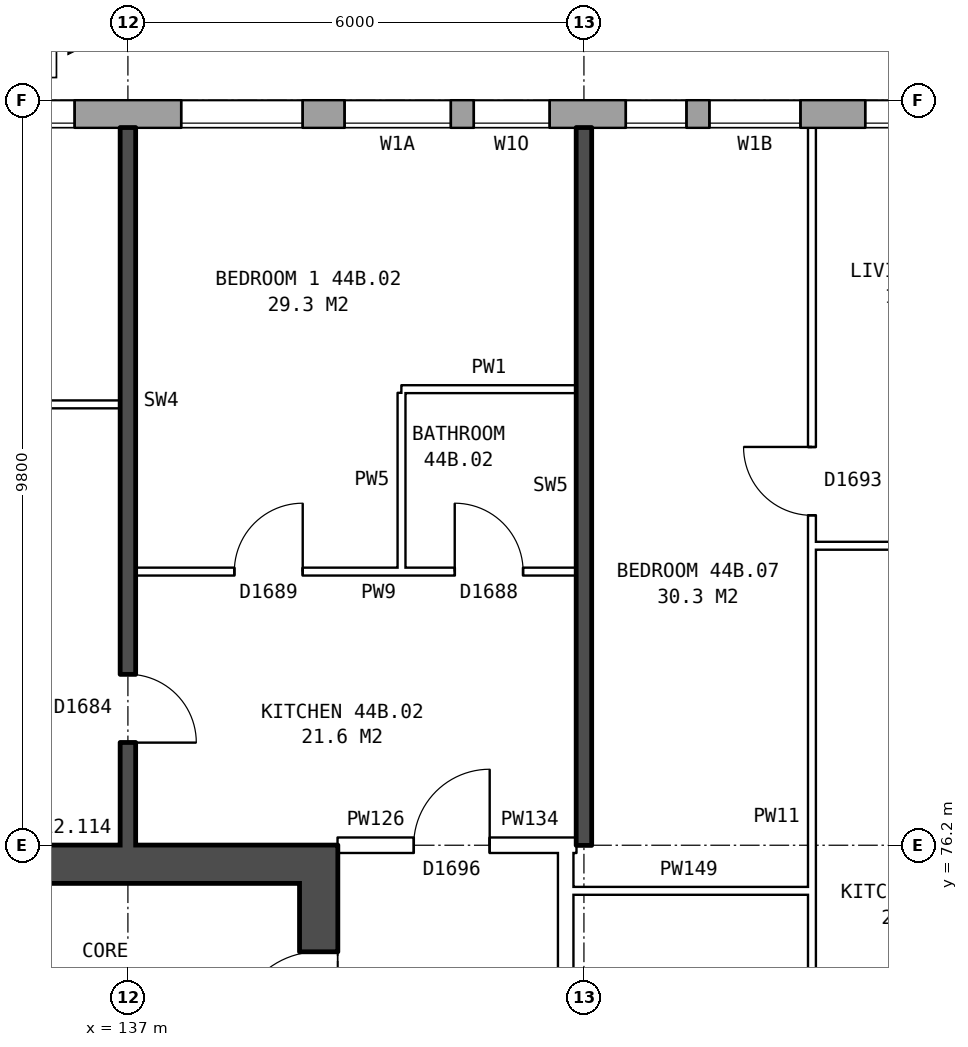
"""IFC4 building model, lengths in metres.
Left out: names, types, materials, properties, quantities, classifications, styles, units other than length and angle.
Written with IfcOpenShell. Run it as: python <this file> out.ifc"""

import sys

from ifc_helpers import new_model, si_unit, direction, frame, frame_2d, origin, place, context, subcontext, project, spatial, rectangle, extrude, element, fill, save


model = new_model("IFC4")
c1 = context("Model", 3, precision=1e-05, world=origin(), true_north=direction((0.0, 1.0)))
c2 = subcontext(c1, "Body", "Model", "MODEL_VIEW")
j1 = project(units=[si_unit("LENGTHUNIT", "METRE"), si_unit("PLANEANGLEUNIT", "RADIAN")], contexts=[c1])
p1 = place(None, origin())
s1 = spatial("IfcSite", under=j1, at=p1, CompositionType="ELEMENT")
p2 = place(p1, origin())
s2 = spatial("IfcBuilding", under=s1, at=p2, CompositionType="ELEMENT")
p3 = place(p2, frame((0.0, 0.0, 157.8)))
s3 = spatial("IfcBuildingStorey", under=s2, at=p3, CompositionType="ELEMENT", Elevation=157.8)
p4 = place(p3, frame((168.425, 85.82, 0.0), z_axis=(0.0, 0.0, 1.0), x_axis=(-1.0, 0.0, 0.0)))
e1 = element("IfcWall", 1, at=p4, inside=s3, PredefinedType="STANDARD", context=c2, shape_type="SweptSolid", body=[
    extrude(rectangle(XDim=34.351, YDim=0.36, at=frame_2d((17.175, 0.0))), origin(), (0.0, 0.0, 1.0), 2.85),
])
p5 = place(p4, frame((2.125, 0.0, 0.8)))
e2 = element("IfcOpeningElement", 2, at=p5, cuts=e1, PredefinedType="OPENING", context=c2, shape_type="SweptSolid", body=[
    extrude(rectangle(XDim=1.6, YDim=1.8, at=frame_2d((0.8, 0.9))), frame((0.0, 0.19, 0.0), z_axis=(0.0, -1.0, 0.0), x_axis=(1.0, 0.0, 0.0)), (0.0, 0.0, 1.0), 0.38),
])
p6 = place(p4, frame((5.125, 0.0, 0.8)))
e3 = element("IfcOpeningElement", 3, at=p6, cuts=e1, PredefinedType="OPENING", context=c2, shape_type="SweptSolid", body=[
    extrude(rectangle(XDim=1.6, YDim=1.8, at=frame_2d((0.8, 0.9))), frame((0.0, 0.19, 0.0), z_axis=(0.0, -1.0, 0.0), x_axis=(1.0, 0.0, 0.0)), (0.0, 0.0, 1.0), 0.38),
])
p7 = place(p4, frame((7.625, 0.0, 1.7)))
e4 = element("IfcOpeningElement", 4, at=p7, cuts=e1, PredefinedType="OPENING", context=c2, shape_type="SweptSolid", body=[
    extrude(rectangle(XDim=1.2, YDim=0.9, at=frame_2d((0.6, 0.45))), frame((0.0, 0.19, 0.0), z_axis=(0.0, -1.0, 0.0), x_axis=(1.0, 0.0, 0.0)), (0.0, 0.0, 1.0), 0.38),
])
p8 = place(p4, frame((11.125, 0.0, 0.8)))
e5 = element("IfcOpeningElement", 5, at=p8, cuts=e1, PredefinedType="OPENING", context=c2, shape_type="SweptSolid", body=[
    extrude(rectangle(XDim=1.6, YDim=1.8, at=frame_2d((0.8, 0.9))), frame((0.0, 0.19, 0.0), z_axis=(0.0, -1.0, 0.0), x_axis=(1.0, 0.0, 0.0)), (0.0, 0.0, 1.0), 0.38),
])
p9 = place(p4, frame((14.125, 0.0, 0.8)))
e6 = element("IfcOpeningElement", 6, at=p9, cuts=e1, PredefinedType="OPENING", context=c2, shape_type="SweptSolid", body=[
    extrude(rectangle(XDim=1.6, YDim=1.8, at=frame_2d((0.8, 0.9))), frame((0.0, 0.19, 0.0), z_axis=(0.0, -1.0, 0.0), x_axis=(1.0, 0.0, 0.0)), (0.0, 0.0, 1.0), 0.38),
])
p10 = place(p4, frame((17.125, 0.0, 0.8)))
e7 = element("IfcOpeningElement", 7, at=p10, cuts=e1, PredefinedType="OPENING", context=c2, shape_type="SweptSolid", body=[
    extrude(rectangle(XDim=1.6, YDim=1.8, at=frame_2d((0.8, 0.9))), frame((0.0, 0.19, 0.0), z_axis=(0.0, -1.0, 0.0), x_axis=(1.0, 0.0, 0.0)), (0.0, 0.0, 1.0), 0.38),
])
p11 = place(p4, frame((20.125, 0.0, 0.8)))
e8 = element("IfcOpeningElement", 8, at=p11, cuts=e1, PredefinedType="OPENING", context=c2, shape_type="SweptSolid", body=[
    extrude(rectangle(XDim=1.6, YDim=1.8, at=frame_2d((0.8, 0.9))), frame((0.0, 0.19, 0.0), z_axis=(0.0, -1.0, 0.0), x_axis=(1.0, 0.0, 0.0)), (0.0, 0.0, 1.0), 0.38),
])
p12 = place(p4, frame((22.575, 0.0, 0.45)))
e9 = element("IfcOpeningElement", 9, at=p12, cuts=e1, PredefinedType="OPENING", context=c2, shape_type="SweptSolid", body=[
    extrude(rectangle(XDim=1.2, YDim=1.8, at=frame_2d((0.6, 0.9))), frame((0.0, 0.19, 0.0), z_axis=(0.0, -1.0, 0.0), x_axis=(1.0, 0.0, 0.0)), (0.0, 0.0, 1.0), 0.38),
])
p13 = place(p4, frame((25.875, 0.0, 1.4)))
e10 = element("IfcOpeningElement", 10, at=p13, cuts=e1, PredefinedType="OPENING", context=c2, shape_type="SweptSolid", body=[
    extrude(rectangle(XDim=1.0, YDim=1.2, at=frame_2d((0.5, 0.6))), frame((0.0, 0.19, 0.0), z_axis=(0.0, -1.0, 0.0), x_axis=(1.0, 0.0, 0.0)), (0.0, 0.0, 1.0), 0.38),
])
p14 = place(p4, frame((29.125, 0.0, 0.8)))
e11 = element("IfcOpeningElement", 11, at=p14, cuts=e1, PredefinedType="OPENING", context=c2, shape_type="SweptSolid", body=[
    extrude(rectangle(XDim=1.6, YDim=1.8, at=frame_2d((0.8, 0.9))), frame((0.0, 0.19, 0.0), z_axis=(0.0, -1.0, 0.0), x_axis=(1.0, 0.0, 0.0)), (0.0, 0.0, 1.0), 0.38),
])
p15 = place(p4, frame((32.125, 0.0, 0.8)))
e12 = element("IfcOpeningElement", 12, at=p15, cuts=e1, PredefinedType="OPENING", context=c2, shape_type="SweptSolid", body=[
    extrude(rectangle(XDim=1.6, YDim=1.8, at=frame_2d((0.8, 0.9))), frame((0.0, 0.19, 0.0), z_axis=(0.0, -1.0, 0.0), x_axis=(1.0, 0.0, 0.0)), (0.0, 0.0, 1.0), 0.38),
])
p16 = place(p4, frame((9.975, 0.0, 0.8)))
e13 = element("IfcOpeningElement", 13, at=p16, cuts=e1, PredefinedType="OPENING", context=c2, shape_type="SweptSolid", body=[
    extrude(rectangle(XDim=0.8, YDim=0.9, at=frame_2d((0.4, 0.45))), frame((0.0, 0.19, 0.0), z_axis=(0.0, -1.0, 0.0), x_axis=(1.0, 0.0, 0.0)), (0.0, 0.0, 1.0), 0.38),
])
p17 = place(p4, frame((24.075, 0.0, 0.35)))
e14 = element("IfcOpeningElement", 14, at=p17, cuts=e1, PredefinedType="OPENING", context=c2, shape_type="SweptSolid", body=[
    extrude(rectangle(XDim=0.8, YDim=0.9, at=frame_2d((0.4, 0.45))), frame((0.0, 0.19, 0.0), z_axis=(0.0, -1.0, 0.0), x_axis=(1.0, 0.0, 0.0)), (0.0, 0.0, 1.0), 0.38),
])
p18 = place(p4, frame((27.175, 0.0, 0.8)))
e15 = element("IfcOpeningElement", 15, at=p18, cuts=e1, PredefinedType="OPENING", context=c2, shape_type="SweptSolid", body=[
    extrude(rectangle(XDim=1.4, YDim=1.8, at=frame_2d((0.7, 0.9))), frame((0.0, 0.19, 0.0), z_axis=(0.0, -1.0, 0.0), x_axis=(1.0, 0.0, 0.0)), (0.0, 0.0, 1.0), 0.38),
])
p19 = place(p3, frame((139.51, 63.8, 0.0), z_axis=(0.0, 0.0, 1.0), x_axis=(0.0, 1.0, 0.0)))
e16 = element("IfcWall", 16, at=p19, inside=s3, PredefinedType="SHEAR", context=c2, shape_type="SweptSolid", body=[
    extrude(rectangle(XDim=12.4, YDim=0.5, at=frame_2d((6.2, 0.0))), origin(), (0.0, 0.0, 1.0), 2.85),
])
p20 = place(p19, frame((1.325, 0.0, 0.0)))
e17 = element("IfcOpeningElement", 17, at=p20, cuts=e16, PredefinedType="OPENING", context=c2, shape_type="SweptSolid", body=[
    extrude(rectangle(XDim=1.1, YDim=2.1, at=frame_2d((0.55, 1.05))), frame((0.0, 0.26, 0.0), z_axis=(0.0, -1.0, 0.0), x_axis=(1.0, 0.0, 0.0)), (0.0, 0.0, 1.0), 0.52),
])
p21 = place(p19, frame((3.6, 0.0, 0.0)))
e18 = element("IfcOpeningElement", 18, at=p21, cuts=e16, PredefinedType="OPENING", context=c2, shape_type="SweptSolid", body=[
    extrude(rectangle(XDim=1.1, YDim=2.1, at=frame_2d((0.55, 1.05))), frame((0.0, 0.26, 0.0), z_axis=(0.0, -1.0, 0.0), x_axis=(1.0, 0.0, 0.0)), (0.0, 0.0, 1.0), 0.52),
])
p22 = place(p19, frame((5.8, 0.0, 0.0)))
e19 = element("IfcOpeningElement", 19, at=p22, cuts=e16, PredefinedType="OPENING", context=c2, shape_type="SweptSolid", body=[
    extrude(rectangle(XDim=1.1, YDim=2.1, at=frame_2d((0.55, 1.05))), frame((0.0, 0.26, 0.0), z_axis=(0.0, -1.0, 0.0), x_axis=(1.0, 0.0, 0.0)), (0.0, 0.0, 1.0), 0.52),
])
p23 = place(p19, frame((9.9, 0.0, 0.0)))
e20 = element("IfcOpeningElement", 20, at=p23, cuts=e16, PredefinedType="OPENING", context=c2, shape_type="SweptSolid", body=[
    extrude(rectangle(XDim=1.1, YDim=2.1, at=frame_2d((0.55, 1.05))), frame((0.0, 0.26, 0.0), z_axis=(0.0, -1.0, 0.0), x_axis=(1.0, 0.0, 0.0)), (0.0, 0.0, 1.0), 0.52),
])
p24 = place(p19, frame((8.125, 0.0, 0.0)))
e21 = element("IfcOpeningElement", 21, at=p24, cuts=e16, PredefinedType="OPENING", context=c2, shape_type="SweptSolid", body=[
    extrude(rectangle(XDim=0.85, YDim=2.1, at=frame_2d((0.425, 1.05))), frame((0.0, 0.26, 0.0), z_axis=(0.0, -1.0, 0.0), x_axis=(1.0, 0.0, 0.0)), (0.0, 0.0, 1.0), 0.52),
])
p25 = place(p3, frame((139.26, 75.95, 0.0), z_axis=(0.0, 0.0, 1.0), x_axis=(-1.0, 0.0, 0.0)))
e22 = element("IfcWall", 22, at=p25, inside=s3, PredefinedType="SHEAR", context=c2, shape_type="SweptSolid", body=[
    extrude(rectangle(XDim=7.4, YDim=0.5, at=frame_2d((3.7, 0.0))), origin(), (0.0, 0.0, 1.0), 2.85),
])
p26 = place(p3, frame((142.76, 63.9, 0.0), z_axis=(0.0, 0.0, 1.0), x_axis=(0.0, 1.0, 0.0)))
e23 = element("IfcWall", 23, at=p26, inside=s3, PredefinedType="PARTITIONING", context=c2, shape_type="SweptSolid", body=[
    extrude(rectangle(XDim=12.2, YDim=0.2, at=frame_2d((6.1, 0.0))), origin(), (0.0, 0.0, 1.0), 2.85),
])
p27 = place(p26, frame((5.1, 0.0, 0.0)))
e24 = element("IfcOpeningElement", 24, at=p27, cuts=e23, PredefinedType="OPENING", context=c2, shape_type="SweptSolid", body=[
    extrude(rectangle(XDim=2.0, YDim=2.1, at=frame_2d((1.0, 1.05))), frame((0.0, 0.11, 0.0), z_axis=(0.0, -1.0, 0.0), x_axis=(1.0, 0.0, 0.0)), (0.0, 0.0, 1.0), 0.22),
])
p28 = place(p3, frame((142.76, 75.6, 0.0), z_axis=(0.0, 0.0, 1.0), x_axis=(1.0, 0.0, 0.0)))
e25 = element("IfcWall", 25, at=p28, inside=s3, PredefinedType="PARTITIONING", context=c2, shape_type="SweptSolid", body=[
    extrude(rectangle(XDim=3.24, YDim=0.1, at=frame_2d((1.62, 0.0))), origin(), (0.0, 0.0, 1.0), 2.85),
])
p29 = place(p3, frame((139.76, 76.2, 0.0), z_axis=(0.0, 0.0, 1.0), x_axis=(1.0, 0.0, 0.0)))
e26 = element("IfcWall", 26, at=p29, inside=s3, PredefinedType="PARTITIONING", context=c2, shape_type="SweptSolid", body=[
    extrude(rectangle(XDim=3.0, YDim=0.2, at=frame_2d((1.5, 0.0))), origin(), (0.0, 0.0, 1.0), 2.85),
])
p30 = place(p29, frame((1.0, 0.0, 0.0)))
e27 = element("IfcOpeningElement", 27, at=p30, cuts=e26, PredefinedType="OPENING", context=c2, shape_type="SweptSolid", body=[
    extrude(rectangle(XDim=1.0, YDim=2.1, at=frame_2d((0.5, 1.05))), frame((0.0, 0.11, 0.0), z_axis=(0.0, -1.0, 0.0), x_axis=(1.0, 0.0, 0.0)), (0.0, 0.0, 1.0), 0.22),
])
p31 = place(p3, frame((142.76, 76.2, 0.0), z_axis=(0.0, 0.0, 1.0), x_axis=(1.0, 0.0, 0.0)))
e28 = element("IfcWall", 28, at=p31, inside=s3, PredefinedType="PARTITIONING", context=c2, shape_type="SweptSolid", body=[
    extrude(rectangle(XDim=0.14, YDim=0.2, at=frame_2d((0.07, 0.0))), origin(), (0.0, 0.0, 1.0), 2.85),
])
p32 = place(p3, frame((137.1, 79.8, 0.0), z_axis=(0.0, 0.0, 1.0), x_axis=(1.0, 0.0, 0.0)))
e29 = element("IfcWall", 29, at=p32, inside=s3, PredefinedType="PARTITIONING", context=c2, shape_type="SweptSolid", body=[
    extrude(rectangle(XDim=5.8, YDim=0.1, at=frame_2d((2.9, 0.0))), origin(), (0.0, 0.0, 1.0), 2.85),
])
p33 = place(p32, frame((1.3, 0.0, 0.0)))
e30 = element("IfcOpeningElement", 30, at=p33, cuts=e29, PredefinedType="OPENING", context=c2, shape_type="SweptSolid", body=[
    extrude(rectangle(XDim=0.9, YDim=2.1, at=frame_2d((0.45, 1.05))), frame((0.0, 0.06, 0.0), z_axis=(0.0, -1.0, 0.0), x_axis=(1.0, 0.0, 0.0)), (0.0, 0.0, 1.0), 0.12),
])
p34 = place(p32, frame((4.2, 0.0, 0.0)))
e31 = element("IfcOpeningElement", 31, at=p34, cuts=e29, PredefinedType="OPENING", context=c2, shape_type="SweptSolid", body=[
    extrude(rectangle(XDim=0.9, YDim=2.1, at=frame_2d((0.45, 1.05))), frame((0.0, 0.06, 0.0), z_axis=(0.0, -1.0, 0.0), x_axis=(1.0, 0.0, 0.0)), (0.0, 0.0, 1.0), 0.12),
])
p35 = place(p3, frame((146.0, 80.14, 0.0), z_axis=(0.0, 0.0, 1.0), x_axis=(1.0, 0.0, 0.0)))
e32 = element("IfcWall", 32, at=p35, inside=s3, PredefinedType="PARTITIONING", context=c2, shape_type="SweptSolid", body=[
    extrude(rectangle(XDim=6.0, YDim=0.1, at=frame_2d((3.0, 0.0))), origin(), (0.0, 0.0, 1.0), 2.85),
])
p36 = place(p35, frame((1.05, 0.0, 0.0)))
e33 = element("IfcOpeningElement", 33, at=p36, cuts=e32, PredefinedType="OPENING", context=c2, shape_type="SweptSolid", body=[
    extrude(rectangle(XDim=0.9, YDim=2.1, at=frame_2d((0.45, 1.05))), frame((0.0, 0.06, 0.0), z_axis=(0.0, -1.0, 0.0), x_axis=(1.0, 0.0, 0.0)), (0.0, 0.0, 1.0), 0.12),
])
p37 = place(p35, frame((4.05, 0.0, 0.0)))
e34 = element("IfcOpeningElement", 34, at=p37, cuts=e32, PredefinedType="OPENING", context=c2, shape_type="SweptSolid", body=[
    extrude(rectangle(XDim=0.9, YDim=2.1, at=frame_2d((0.45, 1.05))), frame((0.0, 0.06, 0.0), z_axis=(0.0, -1.0, 0.0), x_axis=(1.0, 0.0, 0.0)), (0.0, 0.0, 1.0), 0.12),
])
p38 = place(p3, frame((131.36, 82.0, 0.0), z_axis=(0.0, 0.0, 1.0), x_axis=(1.0, 0.0, 0.0)))
e35 = element("IfcWall", 35, at=p38, inside=s3, PredefinedType="PARTITIONING", context=c2, shape_type="SweptSolid", body=[
    extrude(rectangle(XDim=5.54, YDim=0.1, at=frame_2d((2.77, 0.0))), origin(), (0.0, 0.0, 1.0), 2.85),
])
p39 = place(p38, frame((2.32, 0.0, 0.0)))
e36 = element("IfcOpeningElement", 36, at=p39, cuts=e35, PredefinedType="OPENING", context=c2, shape_type="SweptSolid", body=[
    extrude(rectangle(XDim=0.9, YDim=2.1, at=frame_2d((0.45, 1.05))), frame((0.0, 0.06, 0.0), z_axis=(0.0, -1.0, 0.0), x_axis=(1.0, 0.0, 0.0)), (0.0, 0.0, 1.0), 0.12),
])
p40 = place(p3, frame((140.6, 82.2, 0.0), z_axis=(0.0, 0.0, 1.0), x_axis=(1.0, 0.0, 0.0)))
e37 = element("IfcWall", 37, at=p40, inside=s3, PredefinedType="PARTITIONING", context=c2, shape_type="SweptSolid", body=[
    extrude(rectangle(XDim=2.3, YDim=0.1, at=frame_2d((1.15, 0.0))), origin(), (0.0, 0.0, 1.0), 2.85),
])
p41 = place(p3, frame((137.0, 76.2, 0.0), z_axis=(0.0, 0.0, 1.0), x_axis=(0.0, 1.0, 0.0)))
e38 = element("IfcWall", 38, at=p41, inside=s3, PredefinedType="SOLIDWALL", context=c2, shape_type="SweptSolid", body=[
    extrude(rectangle(XDim=9.44, YDim=0.2, at=frame_2d((4.72, 0.0))), origin(), (0.0, 0.0, 1.0), 2.85),
])
p42 = place(p41, frame((1.35, 0.0, 0.0)))
e39 = element("IfcOpeningElement", 39, at=p42, cuts=e38, PredefinedType="OPENING", context=c2, shape_type="SweptSolid", body=[
    extrude(rectangle(XDim=0.9, YDim=2.1, at=frame_2d((0.45, 1.05))), frame((0.0, 0.11, 0.0), z_axis=(0.0, -1.0, 0.0), x_axis=(1.0, 0.0, 0.0)), (0.0, 0.0, 1.0), 0.22),
])
p43 = place(p3, frame((140.6, 79.85, 0.0), z_axis=(0.0, 0.0, 1.0), x_axis=(0.0, 1.0, 0.0)))
e40 = element("IfcWall", 40, at=p43, inside=s3, PredefinedType="PARTITIONING", context=c2, shape_type="SweptSolid", body=[
    extrude(rectangle(XDim=2.3, YDim=0.1, at=frame_2d((1.15, 0.0))), origin(), (0.0, 0.0, 1.0), 2.85),
])
p44 = place(p3, frame((143.0, 76.2, 0.0), z_axis=(0.0, 0.0, 1.0), x_axis=(0.0, 1.0, 0.0)))
e41 = element("IfcWall", 41, at=p44, inside=s3, PredefinedType="SOLIDWALL", context=c2, shape_type="SweptSolid", body=[
    extrude(rectangle(XDim=9.44, YDim=0.2, at=frame_2d((4.72, 0.0))), origin(), (0.0, 0.0, 1.0), 2.85),
])
p45 = place(p3, frame((146.0, 71.3, 0.0), z_axis=(0.0, 0.0, 1.0), x_axis=(0.0, 1.0, 0.0)))
e42 = element("IfcWall", 42, at=p45, inside=s3, PredefinedType="PARTITIONING", context=c2, shape_type="SweptSolid", body=[
    extrude(rectangle(XDim=14.34, YDim=0.1, at=frame_2d((7.17, 0.0))), origin(), (0.0, 0.0, 1.0), 2.85),
])
p46 = place(p45, frame((9.24, 0.0, 0.0)))
e43 = element("IfcOpeningElement", 43, at=p46, cuts=e42, PredefinedType="OPENING", context=c2, shape_type="SweptSolid", body=[
    extrude(rectangle(XDim=0.9, YDim=2.1, at=frame_2d((0.45, 1.05))), frame((0.0, 0.06, 0.0), z_axis=(0.0, -1.0, 0.0), x_axis=(1.0, 0.0, 0.0)), (0.0, 0.0, 1.0), 0.12),
])
p47 = place(p45, frame((0.4, 0.0, 0.0)))
e44 = element("IfcOpeningElement", 44, at=p47, cuts=e42, PredefinedType="OPENING", context=c2, shape_type="SweptSolid", body=[
    extrude(rectangle(XDim=0.9, YDim=2.1, at=frame_2d((0.45, 1.05))), frame((0.0, 0.06, 0.0), z_axis=(0.0, -1.0, 0.0), x_axis=(1.0, 0.0, 0.0)), (0.0, 0.0, 1.0), 0.12),
])
p48 = place(p11, origin())
e45 = element("IfcWindow", 45, at=p48, inside=s3, PartitioningType="SINGLE_PANEL", PredefinedType="WINDOW", context=c2, shape_type="SweptSolid", body=[
    extrude(rectangle(XDim=1.6, YDim=1.8, at=frame_2d((0.8, 0.9))), frame((0.0, 0.15, 0.0), z_axis=(0.0, -1.0, 0.0), x_axis=(1.0, 0.0, 0.0)), (0.0, 0.0, 1.0), 0.06),
])
fill(e8, e45)
p49 = place(p12, origin())
e46 = element("IfcWindow", 46, at=p49, inside=s3, PartitioningType="SINGLE_PANEL", PredefinedType="WINDOW", context=c2, shape_type="SweptSolid", body=[
    extrude(rectangle(XDim=1.2, YDim=1.8, at=frame_2d((0.6, 0.9))), frame((0.0, 0.15, 0.0), z_axis=(0.0, -1.0, 0.0), x_axis=(1.0, 0.0, 0.0)), (0.0, 0.0, 1.0), 0.06),
])
fill(e9, e46)
p50 = place(p13, origin())
e47 = element("IfcWindow", 47, at=p50, inside=s3, PartitioningType="SINGLE_PANEL", PredefinedType="WINDOW", context=c2, shape_type="SweptSolid", body=[
    extrude(rectangle(XDim=1.0, YDim=1.2, at=frame_2d((0.5, 0.6))), frame((0.0, 0.15, 0.0), z_axis=(0.0, -1.0, 0.0), x_axis=(1.0, 0.0, 0.0)), (0.0, 0.0, 1.0), 0.06),
])
fill(e10, e47)
p51 = place(p14, origin())
e48 = element("IfcWindow", 48, at=p51, inside=s3, PartitioningType="SINGLE_PANEL", PredefinedType="WINDOW", context=c2, shape_type="SweptSolid", body=[
    extrude(rectangle(XDim=1.6, YDim=1.8, at=frame_2d((0.8, 0.9))), frame((0.0, 0.15, 0.0), z_axis=(0.0, -1.0, 0.0), x_axis=(1.0, 0.0, 0.0)), (0.0, 0.0, 1.0), 0.06),
])
fill(e11, e48)
p52 = place(p15, origin())
e49 = element("IfcWindow", 49, at=p52, inside=s3, PartitioningType="SINGLE_PANEL", PredefinedType="WINDOW", context=c2, shape_type="SweptSolid", body=[
    extrude(rectangle(XDim=1.6, YDim=1.8, at=frame_2d((0.8, 0.9))), frame((0.0, 0.15, 0.0), z_axis=(0.0, -1.0, 0.0), x_axis=(1.0, 0.0, 0.0)), (0.0, 0.0, 1.0), 0.06),
])
fill(e12, e49)
p53 = place(p23, origin())
e50 = element("IfcDoor", 50, at=p53, inside=s3, OperationType="SINGLE_SWING_LEFT", PredefinedType="DOOR", context=c2, shape_type="SweptSolid", body=[
    extrude(rectangle(XDim=1.1, YDim=2.1, at=frame_2d((0.55, 1.05))), frame((0.0, 0.235, 0.0), z_axis=(0.0, -1.0, 0.0), x_axis=(1.0, 0.0, 0.0)), (0.0, 0.0, 1.0), 0.05),
])
fill(e20, e50)
p54 = place(p33, origin())
e51 = element("IfcDoor", 51, at=p54, inside=s3, OperationType="SINGLE_SWING_RIGHT", PredefinedType="DOOR", context=c2, shape_type="SweptSolid", body=[
    extrude(rectangle(XDim=0.9, YDim=2.1, at=frame_2d((0.45, 1.05))), frame((0.0, 0.025, 0.0), z_axis=(0.0, -1.0, 0.0), x_axis=(1.0, 0.0, 0.0)), (0.0, 0.0, 1.0), 0.05),
])
fill(e30, e51)
p55 = place(p30, origin())
e52 = element("IfcDoor", 52, at=p55, inside=s3, OperationType="SINGLE_SWING_RIGHT", PredefinedType="DOOR", context=c2, shape_type="SweptSolid", body=[
    extrude(rectangle(XDim=1.0, YDim=2.1, at=frame_2d((0.5, 1.05))), frame((0.0, 0.025, 0.0), z_axis=(0.0, -1.0, 0.0), x_axis=(1.0, 0.0, 0.0)), (0.0, 0.0, 1.0), 0.05),
])
fill(e27, e52)
p56 = place(p42, frame((0.9, 0.0, 0.0), z_axis=(0.0, 0.0, 1.0), x_axis=(-1.0, 0.0, 0.0)))
e53 = element("IfcDoor", 53, at=p56, inside=s3, OperationType="SINGLE_SWING_RIGHT", PredefinedType="DOOR", context=c2, shape_type="SweptSolid", body=[
    extrude(rectangle(XDim=0.9, YDim=2.1, at=frame_2d((0.45, 1.05))), frame((0.0, 0.025, 0.0), z_axis=(0.0, -1.0, 0.0), x_axis=(1.0, 0.0, 0.0)), (0.0, 0.0, 1.0), 0.05),
])
fill(e39, e53)
p57 = place(p34, origin())
e54 = element("IfcDoor", 54, at=p57, inside=s3, OperationType="SINGLE_SWING_LEFT", PredefinedType="DOOR", context=c2, shape_type="SweptSolid", body=[
    extrude(rectangle(XDim=0.9, YDim=2.1, at=frame_2d((0.45, 1.05))), frame((0.0, 0.025, 0.0), z_axis=(0.0, -1.0, 0.0), x_axis=(1.0, 0.0, 0.0)), (0.0, 0.0, 1.0), 0.05),
])
fill(e31, e54)
p58 = place(p46, origin())
e55 = element("IfcDoor", 55, at=p58, inside=s3, OperationType="SINGLE_SWING_RIGHT", PredefinedType="DOOR", context=c2, shape_type="SweptSolid", body=[
    extrude(rectangle(XDim=0.9, YDim=2.1, at=frame_2d((0.45, 1.05))), frame((0.0, 0.025, 0.0), z_axis=(0.0, -1.0, 0.0), x_axis=(1.0, 0.0, 0.0)), (0.0, 0.0, 1.0), 0.05),
])
fill(e43, e55)
p59 = place(p17, origin())
e56 = element("IfcWindow", 56, at=p59, inside=s3, PartitioningType="SINGLE_PANEL", PredefinedType="WINDOW", context=c2, shape_type="SweptSolid", body=[
    extrude(rectangle(XDim=0.8, YDim=0.9, at=frame_2d((0.4, 0.45))), frame((0.0, 0.15, 0.0), z_axis=(0.0, -1.0, 0.0), x_axis=(1.0, 0.0, 0.0)), (0.0, 0.0, 1.0), 0.06),
])
fill(e14, e56)
p60 = place(p18, origin())
e57 = element("IfcWindow", 57, at=p60, inside=s3, PartitioningType="SINGLE_PANEL", PredefinedType="WINDOW", context=c2, shape_type="SweptSolid", body=[
    extrude(rectangle(XDim=1.4, YDim=1.8, at=frame_2d((0.7, 0.9))), frame((0.0, 0.15, 0.0), z_axis=(0.0, -1.0, 0.0), x_axis=(1.0, 0.0, 0.0)), (0.0, 0.0, 1.0), 0.06),
])
fill(e15, e57)
save(model, sys.argv[1])
